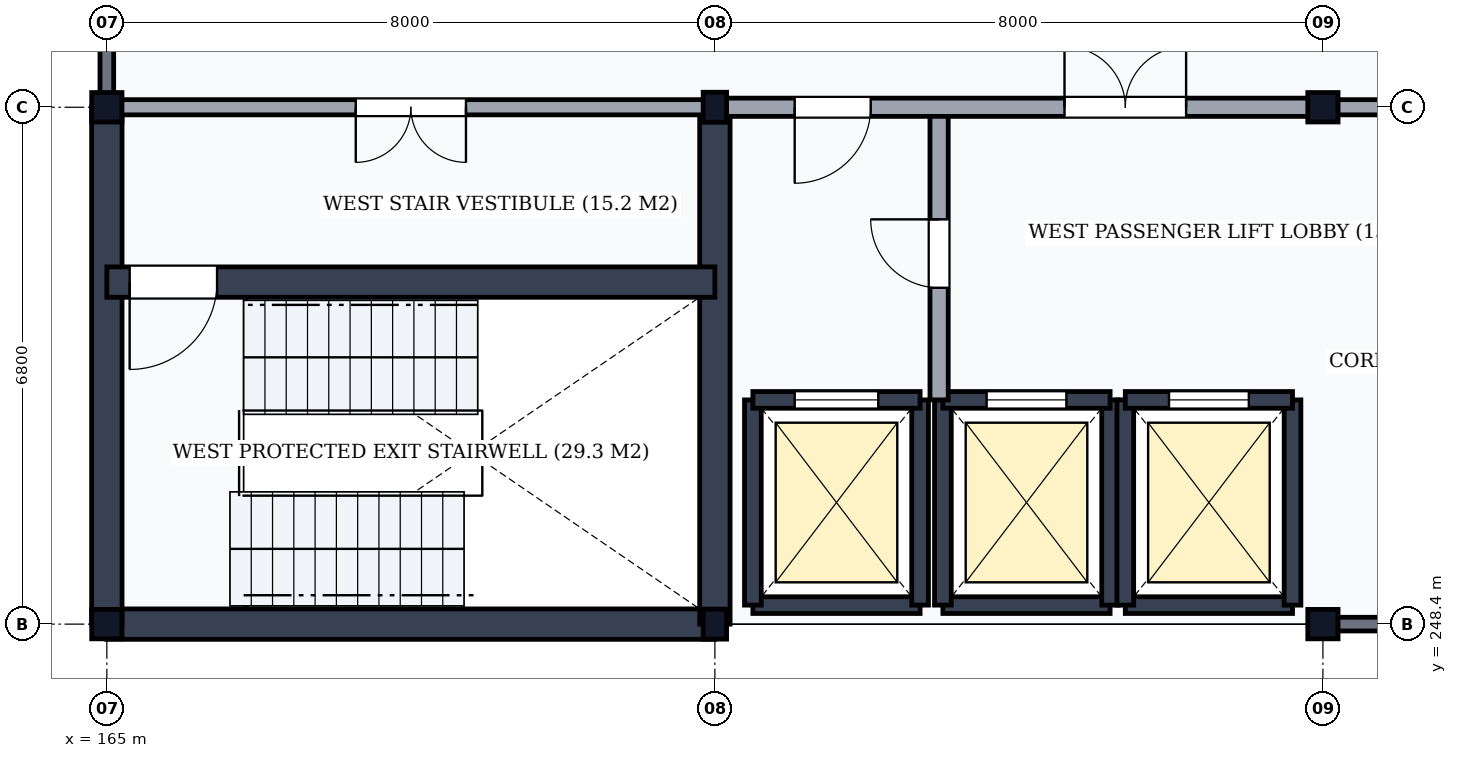
"""IFC4 building model, lengths in metres.
Left out: names, types, materials, properties, quantities, classifications, styles, units other than length and angle.
Written with IfcOpenShell. Run it as: python <this file> out.ifc"""

import sys

from ifc_helpers import new_model, si_unit, direction, frame, frame_2d, origin, origin_2d, place, context, subcontext, project, spatial, rectangle, i_section, extrude, element, fill, save


model = new_model("IFC4")
c1 = context("Model", 3, precision=1e-05, world=origin(), true_north=direction((0.0, 1.0)))
c2 = subcontext(c1, "Body", "Model", "MODEL_VIEW")
j1 = project(units=[si_unit("LENGTHUNIT", "METRE"), si_unit("PLANEANGLEUNIT", "RADIAN")], contexts=[c1])
p1 = place(None, origin())
s1 = spatial("IfcSite", under=j1, at=p1, CompositionType="ELEMENT")
p2 = place(p1, origin())
s2 = spatial("IfcBuilding", under=s1, at=p2, CompositionType="ELEMENT")
p3 = place(p2, frame((0.0, 0.0, 24.3)))
s3 = spatial("IfcBuildingStorey", under=s2, at=p3, CompositionType="ELEMENT", Elevation=24.3)
for number, where, z_axis, x_axis in (
    (1, (165.0, 248.4, 0.0), (0.0, 0.0, 1.0), (1.0, 0.0, 0.0)),
    (2, (165.0, 255.2, 0.0), (0.0, 0.0, 1.0), (1.0, 0.0, 0.0)),
):
    element("IfcColumn", number, at=place(p3, frame(where, z_axis=z_axis, x_axis=x_axis)), inside=s3, PredefinedType="COLUMN", context=c2, shape_type="SweptSolid", body=[
        extrude(i_section(OverallWidth=0.398, OverallDepth=0.387, WebThickness=0.021, FlangeThickness=0.033, FilletRadius=0.015, at=origin_2d()), origin(), (0.0, 0.0, 1.0), 3.9),
    ])
for number, where, z_axis, x_axis in (
    (3, (173.0, 248.4, 0.0), (0.0, 0.0, 1.0), (1.0, 0.0, 0.0)),
    (4, (173.0, 255.2, 0.0), (0.0, 0.0, 1.0), (1.0, 0.0, 0.0)),
):
    element("IfcColumn", number, at=place(p3, frame(where, z_axis=z_axis, x_axis=x_axis)), inside=s3, PredefinedType="COLUMN", context=c2, shape_type="SweptSolid", body=[
        extrude(i_section(OverallWidth=0.308, OverallDepth=0.395, WebThickness=0.021, FlangeThickness=0.04, FilletRadius=0.027, at=origin_2d()), origin(), (0.0, 0.0, 1.0), 3.9),
    ])
for number, where, z_axis, x_axis in (
    (5, (181.0, 248.4, 0.0), (0.0, 0.0, 1.0), (1.0, 0.0, 0.0)),
    (6, (181.0, 255.2, 0.0), (0.0, 0.0, 1.0), (1.0, 0.0, 0.0)),
):
    element("IfcColumn", number, at=place(p3, frame(where, z_axis=z_axis, x_axis=x_axis)), inside=s3, PredefinedType="COLUMN", context=c2, shape_type="SweptSolid", body=[
        extrude(i_section(OverallWidth=0.398, OverallDepth=0.387, WebThickness=0.021, FlangeThickness=0.033, FilletRadius=0.015, at=origin_2d()), origin(), (0.0, 0.0, 1.0), 3.9),
    ])
p4 = place(p3, frame((181.006, 248.4, 0.0), z_axis=(0.0, 0.0, 1.0), x_axis=(1.0, 0.0, 0.0)))
e7 = element("IfcWall", 7, at=p4, inside=s3, PredefinedType="SOLIDWALL", context=c2, shape_type="SweptSolid", body=[
    extrude(rectangle(XDim=7.988, YDim=0.18, at=frame_2d((3.994, 0.0))), origin(), (0.0, 0.0, 1.0), 3.348),
])
p5 = place(p4, frame((3.019, 0.0, 0.95)))
e8 = element("IfcOpeningElement", 8, at=p5, cuts=e7, PredefinedType="OPENING", context=c2, shape_type="SweptSolid", body=[
    extrude(rectangle(XDim=1.35, YDim=1.8, at=frame_2d((0.675, 0.9))), frame((0.0, 0.105, 0.0), z_axis=(0.0, -1.0, 0.0), x_axis=(1.0, 0.0, 0.0)), (0.0, 0.0, 1.0), 0.21),
])
p6 = place(p3, frame((165.0, 255.206, 0.0), z_axis=(0.0, 0.0, 1.0), x_axis=(0.0, 1.0, 0.0)))
e9 = element("IfcWall", 9, at=p6, inside=s3, PredefinedType="SOLIDWALL", context=c2, shape_type="SweptSolid", body=[
    extrude(rectangle(XDim=7.588, YDim=0.18, at=frame_2d((3.794, 0.0))), origin(), (0.0, 0.0, 1.0), 3.388),
])
p7 = place(p3, frame((165.0, 248.4, 0.0), z_axis=(0.0, 0.0, 1.0), x_axis=(1.0, 0.0, 0.0)))
e10 = element("IfcWall", 10, at=p7, inside=s3, PredefinedType="SHEAR", context=c2, shape_type="SweptSolid", body=[
    extrude(rectangle(XDim=8.0, YDim=0.4, at=frame_2d((4.0, 0.0))), origin(), (0.0, 0.0, 1.0), 3.66),
])
for number, where, z_axis, x_axis in (
    (11, (165.0, 248.4, 0.0), (0.0, 0.0, 1.0), (0.0, 1.0, 0.0)),
    (12, (173.0, 248.4, 0.0), (0.0, 0.0, 1.0), (0.0, 1.0, 0.0)),
):
    element("IfcWall", number, at=place(p3, frame(where, z_axis=z_axis, x_axis=x_axis)), inside=s3, PredefinedType="SHEAR", context=c2, shape_type="SweptSolid", body=[
        extrude(rectangle(XDim=6.8, YDim=0.4, at=frame_2d((3.4, 0.0))), origin(), (0.0, 0.0, 1.0), 3.66),
    ])
p8 = place(p3, frame((165.0, 252.9, 0.0), z_axis=(0.0, 0.0, 1.0), x_axis=(1.0, 0.0, 0.0)))
e13 = element("IfcWall", 13, at=p8, inside=s3, PredefinedType="SHEAR", context=c2, shape_type="SweptSolid", body=[
    extrude(rectangle(XDim=8.0, YDim=0.4, at=frame_2d((4.0, 0.0))), origin(), (0.0, 0.0, 1.0), 3.66),
])
p9 = place(p8, frame((0.3, 0.0, 0.0)))
e14 = element("IfcOpeningElement", 14, at=p9, cuts=e13, PredefinedType="OPENING", context=c2, shape_type="SweptSolid", body=[
    extrude(rectangle(XDim=1.15, YDim=2.15, at=frame_2d((0.575, 1.075))), frame((0.0, 0.215, 0.0), z_axis=(0.0, -1.0, 0.0), x_axis=(1.0, 0.0, 0.0)), (0.0, 0.0, 1.0), 0.43),
])
p10 = place(p3, frame((165.0, 255.2, 0.0), z_axis=(0.0, 0.0, 1.0), x_axis=(1.0, 0.0, 0.0)))
e15 = element("IfcWall", 15, at=p10, inside=s3, PredefinedType="PARTITIONING", context=c2, shape_type="SweptSolid", body=[
    extrude(rectangle(XDim=8.0, YDim=0.2, at=frame_2d((4.0, 0.0))), origin(), (0.0, 0.0, 1.0), 3.058),
])
p11 = place(p10, frame((3.275, 0.0, 0.0)))
e16 = element("IfcOpeningElement", 16, at=p11, cuts=e15, PredefinedType="OPENING", context=c2, shape_type="SweptSolid", body=[
    extrude(rectangle(XDim=1.45, YDim=2.2, at=frame_2d((0.725, 1.1))), frame((0.0, 0.115, 0.0), z_axis=(0.0, -1.0, 0.0), x_axis=(1.0, 0.0, 0.0)), (0.0, 0.0, 1.0), 0.23),
])
p12 = place(p3, frame((173.5, 248.65, 0.0), z_axis=(0.0, 0.0, 1.0), x_axis=(1.0, 0.0, 0.0)))
e17 = element("IfcWall", 17, at=p12, inside=s3, PredefinedType="SHEAR", context=c2, shape_type="SweptSolid", body=[
    extrude(rectangle(XDim=2.2, YDim=0.22, at=frame_2d((1.1, 0.0))), origin(), (0.0, 0.0, 1.0), 3.66),
])
for number, where, z_axis, x_axis in (
    (18, (173.5, 248.65, 0.0), (0.0, 0.0, 1.0), (0.0, 1.0, 0.0)),
    (19, (175.7, 248.65, 0.0), (0.0, 0.0, 1.0), (0.0, 1.0, 0.0)),
):
    element("IfcWall", number, at=place(p3, frame(where, z_axis=z_axis, x_axis=x_axis)), inside=s3, PredefinedType="SHEAR", context=c2, shape_type="SweptSolid", body=[
        extrude(rectangle(XDim=2.7, YDim=0.22, at=frame_2d((1.35, 0.0))), origin(), (0.0, 0.0, 1.0), 3.66),
    ])
p13 = place(p3, frame((173.5, 251.35, 0.0), z_axis=(0.0, 0.0, 1.0), x_axis=(1.0, 0.0, 0.0)))
e20 = element("IfcWall", 20, at=p13, inside=s3, PredefinedType="SHEAR", context=c2, shape_type="SweptSolid", body=[
    extrude(rectangle(XDim=2.2, YDim=0.22, at=frame_2d((1.1, 0.0))), origin(), (0.0, 0.0, 1.0), 3.66),
])
p14 = place(p13, frame((0.55, 0.0, 0.0)))
e21 = element("IfcOpeningElement", 21, at=p14, cuts=e20, PredefinedType="OPENING", context=c2, shape_type="SweptSolid", body=[
    extrude(rectangle(XDim=1.1, YDim=2.15, at=frame_2d((0.55, 1.075))), frame((0.0, 0.125, 0.0), z_axis=(0.0, -1.0, 0.0), x_axis=(1.0, 0.0, 0.0)), (0.0, 0.0, 1.0), 0.25),
])
p15 = place(p3, frame((176.0, 248.65, 0.0), z_axis=(0.0, 0.0, 1.0), x_axis=(1.0, 0.0, 0.0)))
e22 = element("IfcWall", 22, at=p15, inside=s3, PredefinedType="SHEAR", context=c2, shape_type="SweptSolid", body=[
    extrude(rectangle(XDim=2.2, YDim=0.22, at=frame_2d((1.1, 0.0))), origin(), (0.0, 0.0, 1.0), 3.66),
])
for number, where, z_axis, x_axis in (
    (23, (176.0, 248.65, 0.0), (0.0, 0.0, 1.0), (0.0, 1.0, 0.0)),
    (24, (178.2, 248.65, 0.0), (0.0, 0.0, 1.0), (0.0, 1.0, 0.0)),
):
    element("IfcWall", number, at=place(p3, frame(where, z_axis=z_axis, x_axis=x_axis)), inside=s3, PredefinedType="SHEAR", context=c2, shape_type="SweptSolid", body=[
        extrude(rectangle(XDim=2.7, YDim=0.22, at=frame_2d((1.35, 0.0))), origin(), (0.0, 0.0, 1.0), 3.66),
    ])
p16 = place(p3, frame((176.0, 251.35, 0.0), z_axis=(0.0, 0.0, 1.0), x_axis=(1.0, 0.0, 0.0)))
e25 = element("IfcWall", 25, at=p16, inside=s3, PredefinedType="SHEAR", context=c2, shape_type="SweptSolid", body=[
    extrude(rectangle(XDim=2.2, YDim=0.22, at=frame_2d((1.1, 0.0))), origin(), (0.0, 0.0, 1.0), 3.66),
])
p17 = place(p16, frame((0.575, 0.0, 0.0)))
e26 = element("IfcOpeningElement", 26, at=p17, cuts=e25, PredefinedType="OPENING", context=c2, shape_type="SweptSolid", body=[
    extrude(rectangle(XDim=1.05, YDim=2.15, at=frame_2d((0.525, 1.075))), frame((0.0, 0.125, 0.0), z_axis=(0.0, -1.0, 0.0), x_axis=(1.0, 0.0, 0.0)), (0.0, 0.0, 1.0), 0.25),
])
p18 = place(p3, frame((178.4, 248.65, 0.0), z_axis=(0.0, 0.0, 1.0), x_axis=(1.0, 0.0, 0.0)))
e27 = element("IfcWall", 27, at=p18, inside=s3, PredefinedType="SHEAR", context=c2, shape_type="SweptSolid", body=[
    extrude(rectangle(XDim=2.2, YDim=0.22, at=frame_2d((1.1, 0.0))), origin(), (0.0, 0.0, 1.0), 3.66),
])
for number, where, z_axis, x_axis in (
    (28, (178.4, 248.65, 0.0), (0.0, 0.0, 1.0), (0.0, 1.0, 0.0)),
    (29, (180.6, 248.65, 0.0), (0.0, 0.0, 1.0), (0.0, 1.0, 0.0)),
):
    element("IfcWall", number, at=place(p3, frame(where, z_axis=z_axis, x_axis=x_axis)), inside=s3, PredefinedType="SHEAR", context=c2, shape_type="SweptSolid", body=[
        extrude(rectangle(XDim=2.7, YDim=0.22, at=frame_2d((1.35, 0.0))), origin(), (0.0, 0.0, 1.0), 3.66),
    ])
p19 = place(p3, frame((178.4, 251.35, 0.0), z_axis=(0.0, 0.0, 1.0), x_axis=(1.0, 0.0, 0.0)))
e30 = element("IfcWall", 30, at=p19, inside=s3, PredefinedType="SHEAR", context=c2, shape_type="SweptSolid", body=[
    extrude(rectangle(XDim=2.2, YDim=0.22, at=frame_2d((1.1, 0.0))), origin(), (0.0, 0.0, 1.0), 3.66),
])
p20 = place(p19, frame((0.575, 0.0, 0.0)))
e31 = element("IfcOpeningElement", 31, at=p20, cuts=e30, PredefinedType="OPENING", context=c2, shape_type="SweptSolid", body=[
    extrude(rectangle(XDim=1.05, YDim=2.15, at=frame_2d((0.525, 1.075))), frame((0.0, 0.125, 0.0), z_axis=(0.0, -1.0, 0.0), x_axis=(1.0, 0.0, 0.0)), (0.0, 0.0, 1.0), 0.25),
])
p21 = place(p3, frame((175.95, 251.35, 0.0), z_axis=(0.0, 0.0, 1.0), x_axis=(0.0, 1.0, 0.0)))
e32 = element("IfcWall", 32, at=p21, inside=s3, PredefinedType="PARTITIONING", context=c2, shape_type="SweptSolid", body=[
    extrude(rectangle(XDim=3.85, YDim=0.24, at=frame_2d((1.925, 0.0))), origin(), (0.0, 0.0, 1.0), 3.66),
])
p22 = place(p21, frame((1.475, 0.0, 0.0)))
e33 = element("IfcOpeningElement", 33, at=p22, cuts=e32, PredefinedType="OPENING", context=c2, shape_type="SweptSolid", body=[
    extrude(rectangle(XDim=0.9, YDim=2.1, at=frame_2d((0.45, 1.05))), frame((0.0, 0.135, 0.0), z_axis=(0.0, -1.0, 0.0), x_axis=(1.0, 0.0, 0.0)), (0.0, 0.0, 1.0), 0.27),
])
p23 = place(p3, frame((173.0, 255.2, 0.0), z_axis=(0.0, 0.0, 1.0), x_axis=(1.0, 0.0, 0.0)))
e34 = element("IfcWall", 34, at=p23, inside=s3, PredefinedType="PARTITIONING", context=c2, shape_type="SweptSolid", body=[
    extrude(rectangle(XDim=8.0, YDim=0.24, at=frame_2d((4.0, 0.0))), origin(), (0.0, 0.0, 1.0), 3.058),
])
p24 = place(p23, frame((1.05, 0.0, 0.0)))
e35 = element("IfcOpeningElement", 35, at=p24, cuts=e34, PredefinedType="OPENING", context=c2, shape_type="SweptSolid", body=[
    extrude(rectangle(XDim=1.0, YDim=2.1, at=frame_2d((0.5, 1.05))), frame((0.0, 0.135, 0.0), z_axis=(0.0, -1.0, 0.0), x_axis=(1.0, 0.0, 0.0)), (0.0, 0.0, 1.0), 0.27),
])
p25 = place(p23, frame((4.6, 0.0, 0.0)))
e36 = element("IfcOpeningElement", 36, at=p25, cuts=e34, PredefinedType="OPENING", context=c2, shape_type="SweptSolid", body=[
    extrude(rectangle(XDim=1.6, YDim=2.25, at=frame_2d((0.8, 1.125))), frame((0.0, 0.135, 0.0), z_axis=(0.0, -1.0, 0.0), x_axis=(1.0, 0.0, 0.0)), (0.0, 0.0, 1.0), 0.27),
])
p26 = place(p3, frame((181.0, 255.2, 0.0), z_axis=(0.0, 0.0, 1.0), x_axis=(1.0, 0.0, 0.0)))
e37 = element("IfcWall", 37, at=p26, inside=s3, PredefinedType="PARTITIONING", context=c2, shape_type="SweptSolid", body=[
    extrude(rectangle(XDim=8.0, YDim=0.2, at=frame_2d((4.0, 0.0))), origin(), (0.0, 0.0, 1.0), 3.058),
])
p27 = place(p26, frame((0.85, 0.0, 0.0)))
e38 = element("IfcOpeningElement", 38, at=p27, cuts=e37, PredefinedType="OPENING", context=c2, shape_type="SweptSolid", body=[
    extrude(rectangle(XDim=0.9, YDim=2.1, at=frame_2d((0.45, 1.05))), frame((0.0, 0.115, 0.0), z_axis=(0.0, -1.0, 0.0), x_axis=(1.0, 0.0, 0.0)), (0.0, 0.0, 1.0), 0.23),
])
p28 = place(p26, frame((3.25, 0.0, 0.0)))
e39 = element("IfcOpeningElement", 39, at=p28, cuts=e37, PredefinedType="OPENING", context=c2, shape_type="SweptSolid", body=[
    extrude(rectangle(XDim=0.9, YDim=2.1, at=frame_2d((0.45, 1.05))), frame((0.0, 0.115, 0.0), z_axis=(0.0, -1.0, 0.0), x_axis=(1.0, 0.0, 0.0)), (0.0, 0.0, 1.0), 0.23),
])
p29 = place(p26, frame((5.075, 0.0, 0.0)))
e40 = element("IfcOpeningElement", 40, at=p29, cuts=e37, PredefinedType="OPENING", context=c2, shape_type="SweptSolid", body=[
    extrude(rectangle(XDim=0.95, YDim=2.1, at=frame_2d((0.475, 1.05))), frame((0.0, 0.115, 0.0), z_axis=(0.0, -1.0, 0.0), x_axis=(1.0, 0.0, 0.0)), (0.0, 0.0, 1.0), 0.23),
])
p30 = place(p26, frame((6.5, 0.0, 0.0)))
e41 = element("IfcOpeningElement", 41, at=p30, cuts=e37, PredefinedType="OPENING", context=c2, shape_type="SweptSolid", body=[
    extrude(rectangle(XDim=0.85, YDim=2.1, at=frame_2d((0.425, 1.05))), frame((0.0, 0.115, 0.0), z_axis=(0.0, -1.0, 0.0), x_axis=(1.0, 0.0, 0.0)), (0.0, 0.0, 1.0), 0.23),
])
p31 = place(p9, frame((1.15, 0.0, 0.0), z_axis=(0.0, 0.0, 1.0), x_axis=(-1.0, 0.0, 0.0)))
e42 = element("IfcDoor", 42, at=p31, inside=s3, OperationType="SINGLE_SWING_RIGHT", PredefinedType="DOOR", context=c2, shape_type="SweptSolid", body=[
    extrude(rectangle(XDim=1.15, YDim=2.15, at=frame_2d((0.575, 1.075))), frame((0.0, 0.025, 0.0), z_axis=(0.0, -1.0, 0.0), x_axis=(1.0, 0.0, 0.0)), (0.0, 0.0, 1.0), 0.05),
])
fill(e14, e42)
p32 = place(p11, frame((1.45, 0.0, 0.0), z_axis=(0.0, 0.0, 1.0), x_axis=(-1.0, 0.0, 0.0)))
e43 = element("IfcDoor", 43, at=p32, inside=s3, OperationType="DOUBLE_DOOR_SINGLE_SWING", PredefinedType="DOOR", context=c2, shape_type="SweptSolid", body=[
    extrude(rectangle(XDim=1.45, YDim=2.2, at=frame_2d((0.725, 1.1))), frame((0.0, 0.025, 0.0), z_axis=(0.0, -1.0, 0.0), x_axis=(1.0, 0.0, 0.0)), (0.0, 0.0, 1.0), 0.05),
])
fill(e16, e43)
p33 = place(p14, origin())
e44 = element("IfcDoor", 44, at=p33, inside=s3, OperationType="DOUBLE_DOOR_SLIDING", PredefinedType="USERDEFINED", context=c2, shape_type="SweptSolid", body=[
    extrude(rectangle(XDim=1.1, YDim=2.15, at=frame_2d((0.55, 1.075))), frame((0.0, 0.025, 0.0), z_axis=(0.0, -1.0, 0.0), x_axis=(1.0, 0.0, 0.0)), (0.0, 0.0, 1.0), 0.05),
])
fill(e21, e44)
p34 = place(p17, origin())
e45 = element("IfcDoor", 45, at=p34, inside=s3, OperationType="DOUBLE_DOOR_SLIDING", PredefinedType="USERDEFINED", context=c2, shape_type="SweptSolid", body=[
    extrude(rectangle(XDim=1.05, YDim=2.15, at=frame_2d((0.525, 1.075))), frame((0.0, 0.025, 0.0), z_axis=(0.0, -1.0, 0.0), x_axis=(1.0, 0.0, 0.0)), (0.0, 0.0, 1.0), 0.05),
])
fill(e26, e45)
p35 = place(p20, origin())
e46 = element("IfcDoor", 46, at=p35, inside=s3, OperationType="DOUBLE_DOOR_SLIDING", PredefinedType="USERDEFINED", context=c2, shape_type="SweptSolid", body=[
    extrude(rectangle(XDim=1.05, YDim=2.15, at=frame_2d((0.525, 1.075))), frame((0.0, 0.025, 0.0), z_axis=(0.0, -1.0, 0.0), x_axis=(1.0, 0.0, 0.0)), (0.0, 0.0, 1.0), 0.05),
])
fill(e31, e46)
p36 = place(p22, frame((0.9, 0.0, 0.0), z_axis=(0.0, 0.0, 1.0), x_axis=(-1.0, 0.0, 0.0)))
e47 = element("IfcDoor", 47, at=p36, inside=s3, OperationType="SINGLE_SWING_LEFT", PredefinedType="DOOR", context=c2, shape_type="SweptSolid", body=[
    extrude(rectangle(XDim=0.9, YDim=2.1, at=frame_2d((0.45, 1.05))), frame((0.0, 0.025, 0.0), z_axis=(0.0, -1.0, 0.0), x_axis=(1.0, 0.0, 0.0)), (0.0, 0.0, 1.0), 0.05),
])
fill(e33, e47)
p37 = place(p24, frame((1.0, 0.0, 0.0), z_axis=(0.0, 0.0, 1.0), x_axis=(-1.0, 0.0, 0.0)))
e48 = element("IfcDoor", 48, at=p37, inside=s3, OperationType="SINGLE_SWING_RIGHT", PredefinedType="DOOR", context=c2, shape_type="SweptSolid", body=[
    extrude(rectangle(XDim=1.0, YDim=2.1, at=frame_2d((0.5, 1.05))), frame((0.0, 0.025, 0.0), z_axis=(0.0, -1.0, 0.0), x_axis=(1.0, 0.0, 0.0)), (0.0, 0.0, 1.0), 0.05),
])
fill(e35, e48)
p38 = place(p25, origin())
e49 = element("IfcDoor", 49, at=p38, inside=s3, OperationType="DOUBLE_DOOR_SINGLE_SWING", PredefinedType="DOOR", context=c2, shape_type="SweptSolid", body=[
    extrude(rectangle(XDim=1.6, YDim=2.25, at=frame_2d((0.8, 1.125))), frame((0.0, 0.025, 0.0), z_axis=(0.0, -1.0, 0.0), x_axis=(1.0, 0.0, 0.0)), (0.0, 0.0, 1.0), 0.05),
])
fill(e36, e49)
save(model, sys.argv[1])
